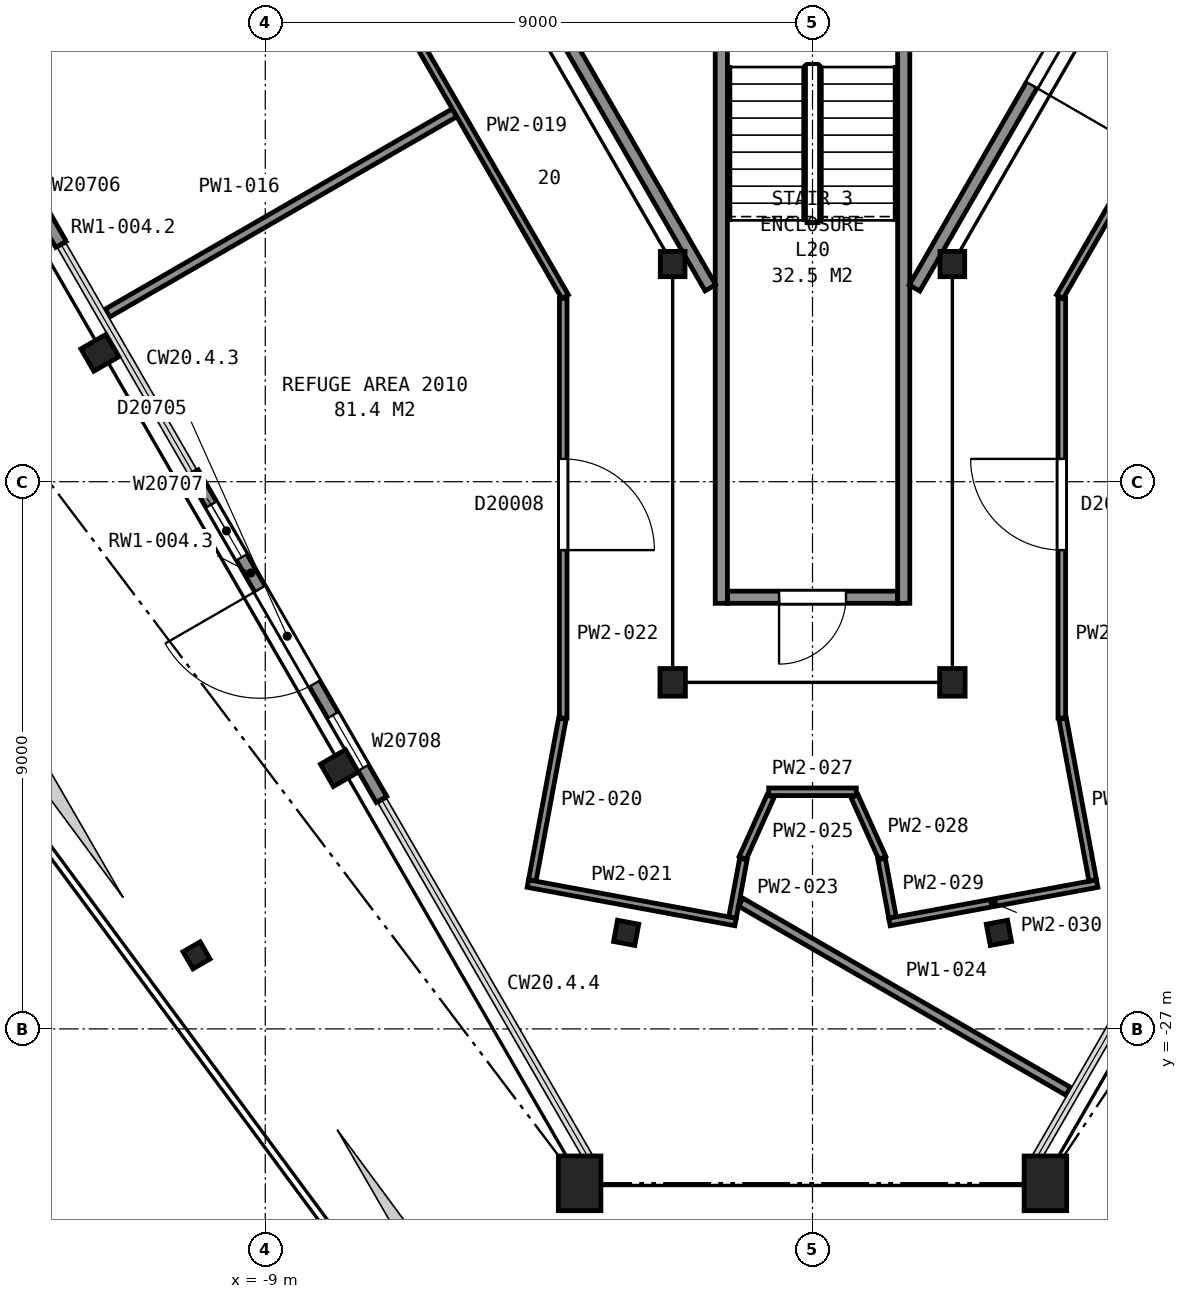
"""IFC4 building model, lengths in metres.
Left out: names, types, materials, properties, quantities, classifications, styles, units other than length and angle.
Written with IfcOpenShell. Run it as: python <this file> out.ifc"""

import sys

from ifc_helpers import new_model, si_unit, direction, frame, frame_2d, origin, origin_2d, place, context, subcontext, project, spatial, rectangle, hollow_rectangle, hollow_circle, i_section, extrude, element, fill, save


model = new_model("IFC4")
c1 = context("Model", 3, precision=1e-05, world=origin(), true_north=direction((0.0, 1.0)))
c2 = subcontext(c1, "Body", "Model", "MODEL_VIEW")
j1 = project(units=[si_unit("LENGTHUNIT", "METRE"), si_unit("PLANEANGLEUNIT", "RADIAN")], contexts=[c1])
p1 = place(None, origin())
s1 = spatial("IfcSite", under=j1, at=p1, CompositionType="ELEMENT")
p2 = place(p1, origin())
s2 = spatial("IfcBuilding", under=s1, at=p2, CompositionType="ELEMENT")
p3 = place(p2, frame((0.0, 0.0, 87.2)))
s3 = spatial("IfcBuildingStorey", under=s2, at=p3, CompositionType="ELEMENT", Elevation=87.2)
for number, where, z_axis, x_axis in (
    (1, (-11.72, -15.88, -0.16), (0.0, 0.0, 1.0), (-0.5, 0.866, 0.0)),
    (2, (-7.78, -22.71, -0.16), (0.0, 0.0, 1.0), (-0.5, 0.866, 0.0)),
):
    element("IfcColumn", number, at=place(p3, frame(where, z_axis=z_axis, x_axis=x_axis)), inside=s3, PredefinedType="COLUMN", context=c2, shape_type="SweptSolid", body=[
        extrude(i_section(OverallWidth=0.424, OverallDepth=0.475, WebThickness=0.048, FlangeThickness=0.077, FilletRadius=0.015, at=origin_2d()), origin(), (0.0, 0.0, 1.0), 5.76),
    ])
for number, where, z_axis, x_axis in (
    (3, (-3.83, -29.54, -0.16), (0.0, 0.0, 1.0), (-1.0, 0.0, 0.0)),
    (4, (3.83, -29.54, -0.16), (0.0, 0.0, 1.0), (-1.0, 0.0, 0.0)),
):
    element("IfcColumn", number, at=place(p3, frame(where, z_axis=z_axis, x_axis=x_axis)), inside=s3, PredefinedType="COLUMN", context=c2, shape_type="SweptSolid", body=[
        extrude(hollow_rectangle(XDim=0.7, YDim=0.9, WallThickness=0.065, at=origin_2d()), origin(), (0.0, 0.0, 1.0), 5.76),
    ])
p4 = place(p3, frame((-2.3, -14.42, 0.0), z_axis=(0.0, 0.0, 1.0), x_axis=(1.0, 0.0, 0.0)))
e5 = element("IfcColumn", 5, at=p4, inside=s3, PredefinedType="COLUMN", context=c2, shape_type="SweptSolid", body=[
    extrude(i_section(OverallWidth=0.406, OverallDepth=0.417, WebThickness=0.03, FlangeThickness=0.048, FilletRadius=0.015, at=origin_2d()), origin(), (0.0, 0.0, 1.0), 5.6),
])
for number, where, z_axis, x_axis in (
    (6, (-2.3, -21.3, 0.0), (0.0, 0.0, 1.0), (-1.0, 0.0, 0.0)),
    (7, (2.3, -21.3, 0.0), (0.0, 0.0, 1.0), (-1.0, 0.0, 0.0)),
):
    element("IfcColumn", number, at=place(p3, frame(where, z_axis=z_axis, x_axis=x_axis)), inside=s3, PredefinedType="COLUMN", context=c2, shape_type="SweptSolid", body=[
        extrude(i_section(OverallWidth=0.419, OverallDepth=0.455, WebThickness=0.042, FlangeThickness=0.068, FilletRadius=0.015, at=origin_2d()), origin(), (0.0, 0.0, 1.0), 5.6),
    ])
p5 = place(p3, frame((2.3, -14.42, 0.0), z_axis=(0.0, 0.0, 1.0), x_axis=(1.0, 0.0, 0.0)))
e8 = element("IfcColumn", 8, at=p5, inside=s3, PredefinedType="COLUMN", context=c2, shape_type="SweptSolid", body=[
    extrude(i_section(OverallWidth=0.406, OverallDepth=0.417, WebThickness=0.03, FlangeThickness=0.048, FilletRadius=0.015, at=origin_2d()), origin(), (0.0, 0.0, 1.0), 5.6),
])
p6 = place(p3, frame((-10.13, -25.79, -0.73), z_axis=(0.0, 0.0, 1.0), x_axis=(-0.5, 0.866025403784, 0.0)))
e9 = element("IfcColumn", 9, at=p6, inside=s3, PredefinedType="COLUMN", context=c2, shape_type="SweptSolid", body=[
    extrude(hollow_circle(Radius=0.163, WallThickness=0.013, at=origin_2d()), origin(), (0.0, 0.0, 1.0), 5.17),
])
for number, where, z_axis, x_axis in (
    (10, (-3.065, -25.42, -0.16), (0.0, 0.0, 1.0), (0.983, -0.183, 0.0)),
    (11, (3.065, -25.42, -0.16), (0.0, 0.0, 1.0), (0.983, 0.183, 0.0)),
):
    element("IfcColumn", number, at=place(p3, frame(where, z_axis=z_axis, x_axis=x_axis)), inside=s3, PredefinedType="COLUMN", context=c2, shape_type="SweptSolid", body=[
        extrude(hollow_rectangle(XDim=0.356, YDim=0.356, WallThickness=0.013, InnerFilletRadius=0.006, OuterFilletRadius=0.019, at=origin_2d()), origin(), (0.0, 0.0, 1.0), 5.6),
    ])
p7 = place(p3, frame((-15.459, -8.726, 0.0), z_axis=(0.0, 0.0, 1.0), x_axis=(0.500009909098, -0.866019682689, 0.0)))
e12 = element("IfcWall", 12, at=p7, inside=s3, PredefinedType="SOLIDWALL", context=c2, shape_type="SweptSolid", body=[
    extrude(rectangle(XDim=6.2, YDim=0.2, at=frame_2d((3.1, 0.0))), origin(), (0.0, 0.0, 1.0), 4.323),
])
p8 = place(p7, frame((0.6, 0.0, 0.9)))
e13 = element("IfcOpeningElement", 13, at=p8, cuts=e12, PredefinedType="OPENING", context=c2, shape_type="SweptSolid", body=[
    extrude(rectangle(XDim=1.0, YDim=1.5, at=frame_2d((0.5, 0.75))), frame((0.0, 0.11, 0.0), z_axis=(0.0, -1.0, 0.0), x_axis=(1.0, 0.0, 0.0)), (0.0, 0.0, 1.0), 0.22),
])
p9 = place(p7, frame((2.2, 0.0, 0.0)))
e14 = element("IfcOpeningElement", 14, at=p9, cuts=e12, PredefinedType="OPENING", context=c2, shape_type="SweptSolid", body=[
    extrude(rectangle(XDim=1.8, YDim=2.4, at=frame_2d((0.9, 1.2))), frame((0.0, 0.11, 0.0), z_axis=(0.0, -1.0, 0.0), x_axis=(1.0, 0.0, 0.0)), (0.0, 0.0, 1.0), 0.22),
])
p10 = place(p7, frame((4.6, 0.0, 0.9)))
e15 = element("IfcOpeningElement", 15, at=p10, cuts=e12, PredefinedType="OPENING", context=c2, shape_type="SweptSolid", body=[
    extrude(rectangle(XDim=1.0, YDim=1.5, at=frame_2d((0.5, 0.75))), frame((0.0, 0.11, 0.0), z_axis=(0.0, -1.0, 0.0), x_axis=(1.0, 0.0, 0.0)), (0.0, 0.0, 1.0), 0.22),
])
p11 = place(p3, frame((-10.188, -17.856, 0.0), z_axis=(0.0, 0.0, 1.0), x_axis=(0.49998037582, -0.866036733513, 0.0)))
e16 = element("IfcWall", 16, at=p11, inside=s3, PredefinedType="SOLIDWALL", context=c2, shape_type="SweptSolid", body=[
    extrude(rectangle(XDim=6.2, YDim=0.2, at=frame_2d((3.1, 0.0))), origin(), (0.0, 0.0, 1.0), 4.323),
])
p12 = place(p11, frame((0.6, 0.0, 0.9)))
e17 = element("IfcOpeningElement", 17, at=p12, cuts=e16, PredefinedType="OPENING", context=c2, shape_type="SweptSolid", body=[
    extrude(rectangle(XDim=1.0, YDim=1.5, at=frame_2d((0.5, 0.75))), frame((0.0, 0.11, 0.0), z_axis=(0.0, -1.0, 0.0), x_axis=(1.0, 0.0, 0.0)), (0.0, 0.0, 1.0), 0.22),
])
p13 = place(p11, frame((2.2, 0.0, 0.0)))
e18 = element("IfcOpeningElement", 18, at=p13, cuts=e16, PredefinedType="OPENING", context=c2, shape_type="SweptSolid", body=[
    extrude(rectangle(XDim=1.8, YDim=2.4, at=frame_2d((0.9, 1.2))), frame((0.0, 0.11, 0.0), z_axis=(0.0, -1.0, 0.0), x_axis=(1.0, 0.0, 0.0)), (0.0, 0.0, 1.0), 0.22),
])
p14 = place(p11, frame((4.6, 0.0, 0.9)))
e19 = element("IfcOpeningElement", 19, at=p14, cuts=e16, PredefinedType="OPENING", context=c2, shape_type="SweptSolid", body=[
    extrude(rectangle(XDim=1.0, YDim=1.5, at=frame_2d((0.5, 0.75))), frame((0.0, 0.11, 0.0), z_axis=(0.0, -1.0, 0.0), x_axis=(1.0, 0.0, 0.0)), (0.0, 0.0, 1.0), 0.22),
])
p15 = place(p3, frame((-1.4, -19.9, 0.0), z_axis=(0.0, 0.0, 1.0), x_axis=(1.0, 0.0, 0.0)))
e20 = element("IfcWall", 20, at=p15, inside=s3, PredefinedType="PARTITIONING", context=c2, shape_type="SweptSolid", body=[
    extrude(rectangle(XDim=2.8, YDim=0.2, at=frame_2d((1.4, 0.0))), origin(), (0.0, 0.0, 1.0), 5.35),
])
p16 = place(p15, frame((0.85, 0.0, 0.0)))
e21 = element("IfcOpeningElement", 21, at=p16, cuts=e20, PredefinedType="OPENING", context=c2, shape_type="SweptSolid", body=[
    extrude(rectangle(XDim=1.1, YDim=2.1, at=frame_2d((0.55, 1.05))), frame((0.0, 0.11, 0.0), z_axis=(0.0, -1.0, 0.0), x_axis=(1.0, 0.0, 0.0)), (0.0, 0.0, 1.0), 0.22),
])
for number, where, z_axis, x_axis in (
    (22, (1.5, -8.0, 0.0), (0.0, 0.0, 1.0), (0.0, -1.0, 0.0)),
    (23, (-1.5, -8.0, 0.0), (0.0, 0.0, 1.0), (0.0, -1.0, 0.0)),
):
    element("IfcWall", number, at=place(p3, frame(where, z_axis=z_axis, x_axis=x_axis)), inside=s3, PredefinedType="PARTITIONING", context=c2, shape_type="SweptSolid", body=[
        extrude(rectangle(XDim=12.0, YDim=0.2, at=frame_2d((6.0, 0.0))), origin(), (0.0, 0.0, 1.0), 5.35),
    ])
p17 = place(p3, frame((-13.664, 5.946, 0.0), z_axis=(0.0, 0.0, 1.0), x_axis=(0.499994327219, -0.866028678941, 0.0)))
e24 = element("IfcWall", 24, at=p17, inside=s3, PredefinedType="PARTITIONING", context=c2, shape_type="SweptSolid", body=[
    extrude(rectangle(XDim=23.968, YDim=0.2, at=frame_2d((11.984, 0.0))), origin(), (0.0, 0.0, 1.0), 5.35),
])
p18 = place(p3, frame((1.677, -14.815, 0.0), z_axis=(0.0, 0.0, 1.0), x_axis=(0.49999445743, 0.866028603765, 0.0)))
e25 = element("IfcWall", 25, at=p18, inside=s3, PredefinedType="PARTITIONING", context=c2, shape_type="SweptSolid", body=[
    extrude(rectangle(XDim=5.905, YDim=0.2, at=frame_2d((2.952, 0.0))), origin(), (0.0, 0.0, 1.0), 5.35),
])
p19 = place(p18, frame((3.855, 0.0, 0.0)))
e26 = element("IfcOpeningElement", 26, at=p19, cuts=e25, PredefinedType="OPENING", context=c2, shape_type="SweptSolid", body=[
    extrude(rectangle(XDim=1.8, YDim=2.1, at=frame_2d((0.9, 1.05))), frame((0.0, 0.11, 0.0), z_axis=(0.0, -1.0, 0.0), x_axis=(1.0, 0.0, 0.0)), (0.0, 0.0, 1.0), 0.22),
])
p20 = place(p3, frame((-11.595, -15.227, 0.0), z_axis=(0.0, 0.0, 1.0), x_axis=(0.866055429303, 0.49994799067, 0.0)))
e27 = element("IfcWall", 27, at=p20, inside=s3, PredefinedType="PARTITIONING", context=c2, shape_type="SweptSolid", body=[
    extrude(rectangle(XDim=6.591, YDim=0.15, at=frame_2d((3.295, 0.0))), origin(), (0.0, 0.0, 1.0), 4.262),
])
p21 = place(p3, frame((-4.069, -14.956, 0.0), z_axis=(0.0, 0.0, 1.0), x_axis=(-0.500012742938, 0.866018046521, 0.0)))
e28 = element("IfcWall", 28, at=p21, inside=s3, PredefinedType="PARTITIONING", context=c2, shape_type="SweptSolid", body=[
    extrude(rectangle(XDim=10.92, YDim=0.125, at=frame_2d((5.46, 0.0))), origin(), (0.0, 0.0, 1.0), 4.262),
])
p22 = place(p21, frame((6.47, 0.0, 0.0)))
e29 = element("IfcOpeningElement", 29, at=p22, cuts=e28, PredefinedType="OPENING", context=c2, shape_type="SweptSolid", body=[
    extrude(rectangle(XDim=1.5, YDim=2.1, at=frame_2d((0.75, 1.05))), frame((0.0, 0.073, 0.0), z_axis=(0.0, -1.0, 0.0), x_axis=(1.0, 0.0, 0.0)), (0.0, 0.0, 1.0), 0.145),
])
p23 = place(p3, frame((-4.608, -24.557, 0.0), z_axis=(0.0, 0.0, 1.0), x_axis=(0.182832825261, 0.983144016921, 0.0)))
e30 = element("IfcWall", 30, at=p23, inside=s3, PredefinedType="PARTITIONING", context=c2, shape_type="SweptSolid", body=[
    extrude(rectangle(XDim=2.704, YDim=0.125, at=frame_2d((1.352, 0.0))), origin(), (0.0, 0.0, 1.0), 4.262),
])
p24 = place(p3, frame((-4.681, -24.61, 0.0), z_axis=(0.0, 0.0, 1.0), x_axis=(0.983318803828, -0.181890434158, 0.0)))
e31 = element("IfcWall", 31, at=p24, inside=s3, PredefinedType="PARTITIONING", context=c2, shape_type="SweptSolid", body=[
    extrude(rectangle(XDim=3.474, YDim=0.125, at=frame_2d((1.737, 0.0))), origin(), (0.0, 0.0, 1.0), 4.262),
])
p25 = place(p3, frame((-4.1, -21.887, 0.0), z_axis=(0.0, 0.0, 1.0), x_axis=(0.0, 1.0, 0.0)))
e32 = element("IfcWall", 32, at=p25, inside=s3, PredefinedType="PARTITIONING", context=c2, shape_type="SweptSolid", body=[
    extrude(rectangle(XDim=6.9, YDim=0.125, at=frame_2d((3.45, 0.0))), origin(), (0.0, 0.0, 1.0), 4.262),
])
p26 = place(p25, frame((2.762, 0.0, 0.0)))
e33 = element("IfcOpeningElement", 33, at=p26, cuts=e32, PredefinedType="OPENING", context=c2, shape_type="SweptSolid", body=[
    extrude(rectangle(XDim=1.5, YDim=2.1, at=frame_2d((0.75, 1.05))), frame((0.0, 0.073, 0.0), z_axis=(0.0, -1.0, 0.0), x_axis=(1.0, 0.0, 0.0)), (0.0, 0.0, 1.0), 0.145),
])
p27 = place(p3, frame((-1.315, -25.166, 0.0), z_axis=(0.0, 0.0, 1.0), x_axis=(0.182733726002, 0.983162440994, 0.0)))
e34 = element("IfcWall", 34, at=p27, inside=s3, PredefinedType="PARTITIONING", context=c2, shape_type="SweptSolid", body=[
    extrude(rectangle(XDim=0.977, YDim=0.125, at=frame_2d((0.488, 0.0))), origin(), (0.0, 0.0, 1.0), 4.262),
])
p28 = place(p3, frame((-1.18, -24.917, 0.0), z_axis=(0.0, 0.0, 1.0), x_axis=(0.866004486696, -0.50003622771, 0.0)))
e35 = element("IfcWall", 35, at=p28, inside=s3, PredefinedType="PARTITIONING", context=c2, shape_type="SweptSolid", body=[
    extrude(rectangle(XDim=6.219, YDim=0.15, at=frame_2d((3.109, 0.0))), origin(), (0.0, 0.0, 1.0), 4.262),
])
p29 = place(p3, frame((-1.149, -24.189, 0.0), z_axis=(0.0, 0.0, 1.0), x_axis=(0.410747208264, 0.911749269757, 0.0)))
e36 = element("IfcWall", 36, at=p29, inside=s3, PredefinedType="PARTITIONING", context=c2, shape_type="SweptSolid", body=[
    extrude(rectangle(XDim=1.115, YDim=0.125, at=frame_2d((0.557, 0.0))), origin(), (0.0, 0.0, 1.0), 4.262),
])
p30 = place(p3, frame((-0.72, -23.1, 0.0), z_axis=(0.0, 0.0, 1.0), x_axis=(1.0, 0.0, 0.0)))
e37 = element("IfcWall", 37, at=p30, inside=s3, PredefinedType="PARTITIONING", context=c2, shape_type="SweptSolid", body=[
    extrude(rectangle(XDim=1.441, YDim=0.125, at=frame_2d((0.72, 0.0))), origin(), (0.0, 0.0, 1.0), 4.262),
])
p31 = place(p3, frame((0.691, -23.173, 0.0), z_axis=(0.0, 0.0, 1.0), x_axis=(0.410747208264, -0.911749269757, 0.0)))
e38 = element("IfcWall", 38, at=p31, inside=s3, PredefinedType="PARTITIONING", context=c2, shape_type="SweptSolid", body=[
    extrude(rectangle(XDim=1.115, YDim=0.125, at=frame_2d((0.557, 0.0))), origin(), (0.0, 0.0, 1.0), 4.262),
])
p32 = place(p3, frame((1.137, -24.206, 0.0), z_axis=(0.0, 0.0, 1.0), x_axis=(0.182733726002, -0.983162440994, 0.0)))
e39 = element("IfcWall", 39, at=p32, inside=s3, PredefinedType="PARTITIONING", context=c2, shape_type="SweptSolid", body=[
    extrude(rectangle(XDim=0.977, YDim=0.125, at=frame_2d((0.488, 0.0))), origin(), (0.0, 0.0, 1.0), 4.262),
])
p33 = place(p3, frame((1.266, -25.241, 0.0), z_axis=(0.0, 0.0, 1.0), x_axis=(0.983318803828, 0.181890434158, 0.0)))
e40 = element("IfcWall", 40, at=p33, inside=s3, PredefinedType="PARTITIONING", context=c2, shape_type="SweptSolid", body=[
    extrude(rectangle(XDim=3.474, YDim=0.125, at=frame_2d((1.737, 0.0))), origin(), (0.0, 0.0, 1.0), 4.262),
])
p34 = place(p3, frame((4.1, -14.987, 0.0), z_axis=(0.0, 0.0, 1.0), x_axis=(0.0, -1.0, 0.0)))
e41 = element("IfcWall", 41, at=p34, inside=s3, PredefinedType="PARTITIONING", context=c2, shape_type="SweptSolid", body=[
    extrude(rectangle(XDim=6.9, YDim=0.125, at=frame_2d((3.45, 0.0))), origin(), (0.0, 0.0, 1.0), 4.262),
])
p35 = place(p34, frame((2.638, 0.0, 0.0)))
e42 = element("IfcOpeningElement", 42, at=p35, cuts=e41, PredefinedType="OPENING", context=c2, shape_type="SweptSolid", body=[
    extrude(rectangle(XDim=1.5, YDim=2.1, at=frame_2d((0.75, 1.05))), frame((0.0, 0.073, 0.0), z_axis=(0.0, -1.0, 0.0), x_axis=(1.0, 0.0, 0.0)), (0.0, 0.0, 1.0), 0.145),
])
p36 = place(p3, frame((4.114, -21.899, 0.0), z_axis=(0.0, 0.0, 1.0), x_axis=(0.182832825261, -0.983144016921, 0.0)))
e43 = element("IfcWall", 43, at=p36, inside=s3, PredefinedType="PARTITIONING", context=c2, shape_type="SweptSolid", body=[
    extrude(rectangle(XDim=2.704, YDim=0.125, at=frame_2d((1.352, 0.0))), origin(), (0.0, 0.0, 1.0), 4.262),
])
p37 = place(p3, frame((14.979, 3.956, 0.0), z_axis=(0.0, 0.0, 1.0), x_axis=(-0.499707610415, -0.866194149191, 0.0)))
e44 = element("IfcWall", 44, at=p37, inside=s3, PredefinedType="PARTITIONING", context=c2, shape_type="SweptSolid", body=[
    extrude(rectangle(XDim=21.833, YDim=0.125, at=frame_2d((10.917, 0.0))), origin(), (0.0, 0.0, 1.0), 4.262),
])
p38 = place(p37, frame((10.156, 0.0, 0.0)))
e45 = element("IfcOpeningElement", 45, at=p38, cuts=e44, PredefinedType="OPENING", context=c2, shape_type="SweptSolid", body=[
    extrude(rectangle(XDim=1.5, YDim=2.1, at=frame_2d((0.75, 1.05))), frame((0.0, 0.073, 0.0), z_axis=(0.0, -1.0, 0.0), x_axis=(1.0, 0.0, 0.0)), (0.0, 0.0, 1.0), 0.145),
])
p39 = place(p12, origin())
e46 = element("IfcWindow", 46, at=p39, inside=s3, PartitioningType="SINGLE_PANEL", PredefinedType="WINDOW", context=c2, shape_type="SweptSolid", body=[
    extrude(rectangle(XDim=1.0, YDim=1.5, at=frame_2d((0.5, 0.75))), frame((0.0, 0.03, 0.0), z_axis=(0.0, -1.0, 0.0), x_axis=(1.0, 0.0, 0.0)), (0.0, 0.0, 1.0), 0.06),
])
fill(e17, e46)
p40 = place(p13, frame((1.8, 0.0, 0.0), z_axis=(0.0, 0.0, 1.0), x_axis=(-1.0, 0.0, 0.0)))
e47 = element("IfcDoor", 47, at=p40, inside=s3, OperationType="DOUBLE_DOOR_SINGLE_SWING", PredefinedType="DOOR", context=c2, shape_type="SweptSolid", body=[
    extrude(rectangle(XDim=1.8, YDim=2.4, at=frame_2d((0.9, 1.2))), frame((0.0, 0.025, 0.0), z_axis=(0.0, -1.0, 0.0), x_axis=(1.0, 0.0, 0.0)), (0.0, 0.0, 1.0), 0.05),
])
fill(e18, e47)
p41 = place(p14, origin())
e48 = element("IfcWindow", 48, at=p41, inside=s3, PartitioningType="SINGLE_PANEL", PredefinedType="WINDOW", context=c2, shape_type="SweptSolid", body=[
    extrude(rectangle(XDim=1.0, YDim=1.5, at=frame_2d((0.5, 0.75))), frame((0.0, 0.03, 0.0), z_axis=(0.0, -1.0, 0.0), x_axis=(1.0, 0.0, 0.0)), (0.0, 0.0, 1.0), 0.06),
])
fill(e19, e48)
p42 = place(p16, origin())
e49 = element("IfcDoor", 49, at=p42, inside=s3, OperationType="SINGLE_SWING_LEFT", PredefinedType="DOOR", context=c2, shape_type="SweptSolid", body=[
    extrude(rectangle(XDim=1.1, YDim=2.1, at=frame_2d((0.55, 1.05))), frame((0.0, 0.025, 0.0), z_axis=(0.0, -1.0, 0.0), x_axis=(1.0, 0.0, 0.0)), (0.0, 0.0, 1.0), 0.05),
])
fill(e21, e49)
p43 = place(p19, origin())
e50 = element("IfcDoor", 50, at=p43, inside=s3, OperationType="DOUBLE_DOOR_SINGLE_SWING", PredefinedType="DOOR", context=c2, shape_type="SweptSolid", body=[
    extrude(rectangle(XDim=1.8, YDim=2.1, at=frame_2d((0.9, 1.05))), frame((0.0, 0.025, 0.0), z_axis=(0.0, -1.0, 0.0), x_axis=(1.0, 0.0, 0.0)), (0.0, 0.0, 1.0), 0.05),
])
fill(e26, e50)
p44 = place(p26, origin())
e51 = element("IfcDoor", 51, at=p44, inside=s3, OperationType="DOUBLE_DOOR_SINGLE_SWING", PredefinedType="DOOR", context=c2, shape_type="SweptSolid", body=[
    extrude(rectangle(XDim=1.5, YDim=2.1, at=frame_2d((0.75, 1.05))), frame((0.0, 0.025, 0.0), z_axis=(0.0, -1.0, 0.0), x_axis=(1.0, 0.0, 0.0)), (0.0, 0.0, 1.0), 0.05),
])
fill(e33, e51)
p45 = place(p35, origin())
e52 = element("IfcDoor", 52, at=p45, inside=s3, OperationType="DOUBLE_DOOR_SINGLE_SWING", PredefinedType="DOOR", context=c2, shape_type="SweptSolid", body=[
    extrude(rectangle(XDim=1.5, YDim=2.1, at=frame_2d((0.75, 1.05))), frame((0.0, 0.025, 0.0), z_axis=(0.0, -1.0, 0.0), x_axis=(1.0, 0.0, 0.0)), (0.0, 0.0, 1.0), 0.05),
])
fill(e42, e52)
save(model, sys.argv[1])
